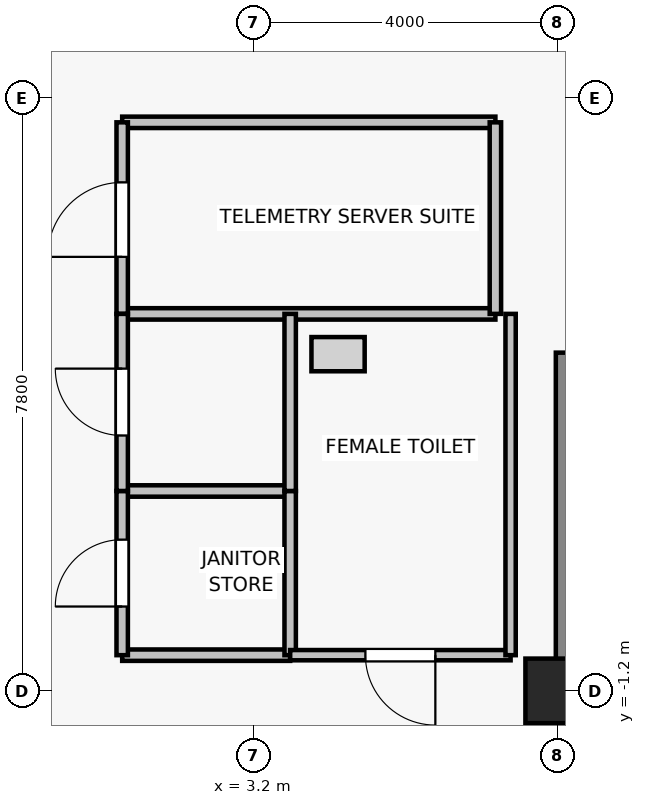
"""IFC4 building model, lengths in metres.
Left out: names, types, materials, properties, quantities, classifications, styles, units other than length and angle.
Written with IfcOpenShell. Run it as: python <this file> out.ifc"""

import sys

from ifc_helpers import new_model, si_unit, direction, frame, frame_2d, origin, origin_2d, place, context, subcontext, project, spatial, rectangle, extrude, source, transform, mapped, element, fill, save


model = new_model("IFC4")
c1 = context("Model", 3, precision=1e-05, world=origin(), true_north=direction((0.0, 1.0)))
c2 = subcontext(c1, "Body", "Model", "MODEL_VIEW")
j1 = project(units=[si_unit("LENGTHUNIT", "METRE"), si_unit("PLANEANGLEUNIT", "RADIAN")], contexts=[c1])
p1 = place(None, origin())
s1 = spatial("IfcSite", under=j1, at=p1, CompositionType="ELEMENT")
p2 = place(p1, origin())
s2 = spatial("IfcBuilding", under=s1, at=p2, CompositionType="ELEMENT")
p3 = place(p2, frame((0.0, 0.0, 261.7)))
s3 = spatial("IfcBuildingStorey", under=s2, at=p3, CompositionType="ELEMENT", Elevation=261.7)
p4 = place(p3, frame((7.2, -1.2, 0.0), z_axis=(0.0, 0.0, 1.0), x_axis=(1.0, 0.0, 0.0)))
e1 = element("IfcColumn", 1, at=p4, inside=s3, PredefinedType="COLUMN", context=c2, shape_type="SweptSolid", body=[
    extrude(rectangle(XDim=0.85, YDim=0.85, at=origin_2d()), origin(), (0.0, 0.0, 1.0), 3.3),
])
p5 = place(p3, frame((7.4, -0.9, 0.0), z_axis=(0.0, 0.0, 1.0), x_axis=(0.0, 1.0, 0.0)))
e2 = element("IfcWall", 2, at=p5, inside=s3, PredefinedType="SHEAR", context=c2, shape_type="SweptSolid", body=[
    extrude(rectangle(XDim=4.15, YDim=0.45, at=frame_2d((2.075, 0.0))), origin(), (0.0, 0.0, 1.0), 3.075),
])
for number, where, z_axis, x_axis in (
    (3, (6.38, 3.76, 0.0), (0.0, 0.0, 1.0), (-1.0, 0.0, 0.0)),
    (4, (1.47, 6.28, 0.0), (0.0, 0.0, 1.0), (1.0, 0.0, 0.0)),
):
    element("IfcWall", number, at=place(p3, frame(where, z_axis=z_axis, x_axis=x_axis)), inside=s3, PredefinedType="PARTITIONING", context=c2, shape_type="SweptSolid", body=[
        extrude(rectangle(XDim=4.91, YDim=0.15, at=frame_2d((2.455, 0.0))), origin(), (0.0, 0.0, 1.0), 3.075),
    ])
p6 = place(p3, frame((1.47, 3.76, 0.0), z_axis=(0.0, 0.0, 1.0), x_axis=(0.0, 1.0, 0.0)))
e5 = element("IfcWall", 5, at=p6, inside=s3, PredefinedType="PARTITIONING", context=c2, shape_type="SweptSolid", body=[
    extrude(rectangle(XDim=2.52, YDim=0.15, at=frame_2d((1.26, 0.0))), origin(), (0.0, 0.0, 1.0), 3.075),
])
p7 = place(p6, frame((0.75, 0.0, 0.0)))
e6 = element("IfcOpeningElement", 6, at=p7, cuts=e5, PredefinedType="OPENING", context=c2, shape_type="SweptSolid", body=[
    extrude(rectangle(XDim=0.98, YDim=2.15, at=frame_2d((0.49, 1.075))), frame((0.0, 0.085, 0.0), z_axis=(0.0, -1.0, 0.0), x_axis=(1.0, 0.0, 0.0)), (0.0, 0.0, 1.0), 0.17),
])
p8 = place(p3, frame((6.38, 6.28, 0.0), z_axis=(0.0, 0.0, 1.0), x_axis=(0.0, -1.0, 0.0)))
e7 = element("IfcWall", 7, at=p8, inside=s3, PredefinedType="PARTITIONING", context=c2, shape_type="SweptSolid", body=[
    extrude(rectangle(XDim=2.52, YDim=0.15, at=frame_2d((1.26, 0.0))), origin(), (0.0, 0.0, 1.0), 3.075),
])
for number, where, z_axis, x_axis in (
    (8, (3.68, -0.73, 0.0), (0.0, 0.0, 1.0), (-1.0, 0.0, 0.0)),
    (9, (1.47, 1.43, 0.0), (0.0, 0.0, 1.0), (1.0, 0.0, 0.0)),
):
    element("IfcWall", number, at=place(p3, frame(where, z_axis=z_axis, x_axis=x_axis)), inside=s3, PredefinedType="PARTITIONING", context=c2, shape_type="SweptSolid", body=[
        extrude(rectangle(XDim=2.21, YDim=0.15, at=frame_2d((1.105, 0.0))), origin(), (0.0, 0.0, 1.0), 3.075),
    ])
p9 = place(p3, frame((1.47, -0.73, 0.0), z_axis=(0.0, 0.0, 1.0), x_axis=(0.0, 1.0, 0.0)))
e10 = element("IfcWall", 10, at=p9, inside=s3, PredefinedType="PARTITIONING", context=c2, shape_type="SweptSolid", body=[
    extrude(rectangle(XDim=2.16, YDim=0.15, at=frame_2d((1.08, 0.0))), origin(), (0.0, 0.0, 1.0), 3.075),
])
p10 = place(p9, frame((0.64, 0.0, 0.0)))
e11 = element("IfcOpeningElement", 11, at=p10, cuts=e10, PredefinedType="OPENING", context=c2, shape_type="SweptSolid", body=[
    extrude(rectangle(XDim=0.88, YDim=2.1, at=frame_2d((0.44, 1.05))), frame((0.0, 0.085, 0.0), z_axis=(0.0, -1.0, 0.0), x_axis=(1.0, 0.0, 0.0)), (0.0, 0.0, 1.0), 0.17),
])
p11 = place(p3, frame((3.68, 1.43, 0.0), z_axis=(0.0, 0.0, 1.0), x_axis=(0.0, -1.0, 0.0)))
e12 = element("IfcWall", 12, at=p11, inside=s3, PredefinedType="PARTITIONING", context=c2, shape_type="SweptSolid", body=[
    extrude(rectangle(XDim=2.16, YDim=0.15, at=frame_2d((1.08, 0.0))), origin(), (0.0, 0.0, 1.0), 3.075),
])
p12 = place(p3, frame((1.47, 1.43, 0.0), z_axis=(0.0, 0.0, 1.0), x_axis=(0.0, 1.0, 0.0)))
e13 = element("IfcWall", 13, at=p12, inside=s3, PredefinedType="PARTITIONING", context=c2, shape_type="SweptSolid", body=[
    extrude(rectangle(XDim=2.33, YDim=0.15, at=frame_2d((1.165, 0.0))), origin(), (0.0, 0.0, 1.0), 3.075),
])
p13 = place(p12, frame((0.73, 0.0, 0.0)))
e14 = element("IfcOpeningElement", 14, at=p13, cuts=e13, PredefinedType="OPENING", context=c2, shape_type="SweptSolid", body=[
    extrude(rectangle(XDim=0.88, YDim=2.15, at=frame_2d((0.44, 1.075))), frame((0.0, 0.085, 0.0), z_axis=(0.0, -1.0, 0.0), x_axis=(1.0, 0.0, 0.0)), (0.0, 0.0, 1.0), 0.17),
])
p14 = place(p3, frame((3.68, 3.76, 0.0), z_axis=(0.0, 0.0, 1.0), x_axis=(0.0, -1.0, 0.0)))
e15 = element("IfcWall", 15, at=p14, inside=s3, PredefinedType="PARTITIONING", context=c2, shape_type="SweptSolid", body=[
    extrude(rectangle(XDim=2.33, YDim=0.15, at=frame_2d((1.165, 0.0))), origin(), (0.0, 0.0, 1.0), 3.075),
])
p15 = place(p3, frame((6.58, -0.73, 0.0), z_axis=(0.0, 0.0, 1.0), x_axis=(-1.0, 0.0, 0.0)))
e16 = element("IfcWall", 16, at=p15, inside=s3, PredefinedType="PARTITIONING", context=c2, shape_type="SweptSolid", body=[
    extrude(rectangle(XDim=2.9, YDim=0.135, at=frame_2d((1.45, 0.0))), origin(), (0.0, 0.0, 1.0), 3.075),
])
p16 = place(p15, frame((0.99, 0.0, 0.0)))
e17 = element("IfcOpeningElement", 17, at=p16, cuts=e16, PredefinedType="OPENING", context=c2, shape_type="SweptSolid", body=[
    extrude(rectangle(XDim=0.92, YDim=2.1, at=frame_2d((0.46, 1.05))), frame((0.0, 0.077, 0.0), z_axis=(0.0, -1.0, 0.0), x_axis=(1.0, 0.0, 0.0)), (0.0, 0.0, 1.0), 0.155),
])
p17 = place(p3, frame((6.58, 3.76, 0.0), z_axis=(0.0, 0.0, 1.0), x_axis=(0.0, -1.0, 0.0)))
e18 = element("IfcWall", 18, at=p17, inside=s3, PredefinedType="PARTITIONING", context=c2, shape_type="SweptSolid", body=[
    extrude(rectangle(XDim=4.49, YDim=0.135, at=frame_2d((2.245, 0.0))), origin(), (0.0, 0.0, 1.0), 3.075),
])
m1 = source(origin(), c2, "Body", "SweptSolid", [
    extrude(rectangle(XDim=0.98, YDim=2.15, at=frame_2d((0.49, 1.075))), frame((0.0, 0.025, 0.0), z_axis=(0.0, -1.0, 0.0), x_axis=(1.0, 0.0, 0.0)), (0.0, 0.0, 1.0), 0.05),
])
p18 = place(p7, origin())
e19 = element("IfcDoor", 19, at=p18, inside=s3, OperationType="SINGLE_SWING_LEFT", PredefinedType="DOOR", context=c2, shape_type="MappedRepresentation", body=[
    mapped(m1, transform((0.0, 0.0, 0.0), x_axis=(1.0, 0.0, 0.0), y_axis=(0.0, 1.0, 0.0), z_axis=(0.0, 0.0, 1.0), scale=1.0)),
])
fill(e6, e19)
m2 = source(origin(), c2, "Body", "SweptSolid", [
    extrude(rectangle(XDim=0.88, YDim=2.1, at=frame_2d((0.44, 1.05))), frame((0.0, 0.025, 0.0), z_axis=(0.0, -1.0, 0.0), x_axis=(1.0, 0.0, 0.0)), (0.0, 0.0, 1.0), 0.05),
])
p19 = place(p10, origin())
e20 = element("IfcDoor", 20, at=p19, inside=s3, OperationType="SINGLE_SWING_LEFT", PredefinedType="DOOR", context=c2, shape_type="MappedRepresentation", body=[
    mapped(m2, transform((0.0, 0.0, 0.0), x_axis=(1.0, 0.0, 0.0), y_axis=(0.0, 1.0, 0.0), z_axis=(0.0, 0.0, 1.0), scale=1.0)),
])
fill(e11, e20)
m3 = source(origin(), c2, "Body", "SweptSolid", [
    extrude(rectangle(XDim=0.88, YDim=2.15, at=frame_2d((0.44, 1.075))), frame((0.0, 0.025, 0.0), z_axis=(0.0, -1.0, 0.0), x_axis=(1.0, 0.0, 0.0)), (0.0, 0.0, 1.0), 0.05),
])
p20 = place(p13, origin())
e21 = element("IfcDoor", 21, at=p20, inside=s3, OperationType="SINGLE_SWING_RIGHT", PredefinedType="DOOR", context=c2, shape_type="MappedRepresentation", body=[
    mapped(m3, transform((0.0, 0.0, 0.0), x_axis=(1.0, 0.0, 0.0), y_axis=(0.0, 1.0, 0.0), z_axis=(0.0, 0.0, 1.0), scale=1.0)),
])
fill(e14, e21)
m4 = source(origin(), c2, "Body", "SweptSolid", [
    extrude(rectangle(XDim=0.92, YDim=2.1, at=frame_2d((0.46, 1.05))), frame((0.0, 0.025, 0.0), z_axis=(0.0, -1.0, 0.0), x_axis=(1.0, 0.0, 0.0)), (0.0, 0.0, 1.0), 0.05),
])
p21 = place(p16, origin())
e22 = element("IfcDoor", 22, at=p21, inside=s3, OperationType="SINGLE_SWING_LEFT", PredefinedType="DOOR", context=c2, shape_type="MappedRepresentation", body=[
    mapped(m4, transform((0.0, 0.0, 0.0), x_axis=(1.0, 0.0, 0.0), y_axis=(0.0, 1.0, 0.0), z_axis=(0.0, 0.0, 1.0), scale=1.0)),
])
fill(e17, e22)
save(model, sys.argv[1])
